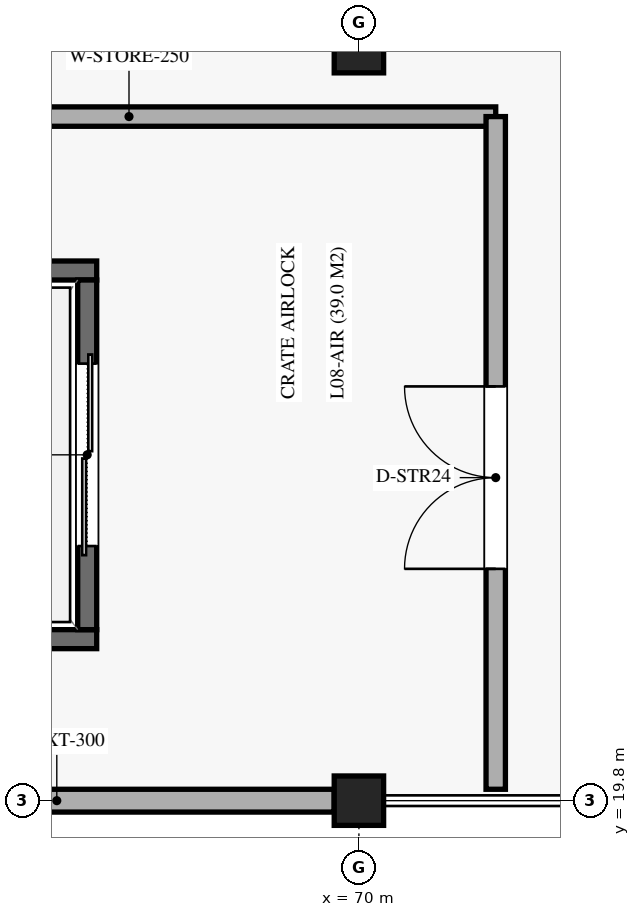
"""IFC4 building model, lengths in metres.
Left out: names, types, materials, properties, quantities, classifications, styles, units other than length and angle.
Written with IfcOpenShell. Run it as: python <this file> out.ifc"""

import sys

from ifc_helpers import new_model, si_unit, direction, frame, frame_2d, origin, origin_2d, place, context, subcontext, project, spatial, rectangle, extrude, element, fill, save


model = new_model("IFC4")
c1 = context("Model", 3, precision=1e-05, world=origin(), true_north=direction((0.0, 1.0)))
c2 = subcontext(c1, "Body", "Model", "MODEL_VIEW")
j1 = project(units=[si_unit("LENGTHUNIT", "METRE"), si_unit("PLANEANGLEUNIT", "RADIAN")], contexts=[c1])
p1 = place(None, origin())
s1 = spatial("IfcSite", under=j1, at=p1, CompositionType="ELEMENT")
p2 = place(p1, origin())
s2 = spatial("IfcBuilding", under=s1, at=p2, CompositionType="ELEMENT")
p3 = place(p2, frame((0.0, 0.0, 42.33)))
s3 = spatial("IfcBuildingStorey", under=s2, at=p3, CompositionType="ELEMENT", Elevation=42.33)
for number, where, z_axis, x_axis in (
    (1, (70.0, 19.8, 0.0), (0.0, 0.0, 1.0), (1.0, 0.0, 0.0)),
    (2, (70.0, 29.7, 0.0), (0.0, 0.0, 1.0), (1.0, 0.0, 0.0)),
):
    element("IfcColumn", number, at=place(p3, frame(where, z_axis=z_axis, x_axis=x_axis)), inside=s3, PredefinedType="COLUMN", context=c2, shape_type="SweptSolid", body=[
        extrude(rectangle(XDim=0.65, YDim=0.65, at=origin_2d()), origin(), (0.0, 0.0, 1.0), 4.59),
    ])
p4 = place(p3, frame((62.375, 19.8, 0.0), z_axis=(0.0, 0.0, 1.0), x_axis=(1.0, 0.0, 0.0)))
e3 = element("IfcWall", 3, at=p4, inside=s3, PredefinedType="SOLIDWALL", context=c2, shape_type="SweptSolid", body=[
    extrude(rectangle(XDim=7.3, YDim=0.3, at=frame_2d((3.65, 0.0))), origin(), (0.0, 0.0, 1.0), 3.59),
])
for number, where, z_axis, x_axis in (
    (4, (62.65, 21.925, 0.0), (0.0, 0.0, 1.0), (1.0, 0.0, 0.0)),
    (5, (62.65, 26.775, 0.0), (0.0, 0.0, 1.0), (1.0, 0.0, 0.0)),
):
    element("IfcWall", number, at=place(p3, frame(where, z_axis=z_axis, x_axis=x_axis)), inside=s3, PredefinedType="SOLIDWALL", context=c2, shape_type="SweptSolid", body=[
        extrude(rectangle(XDim=3.9, YDim=0.25, at=frame_2d((1.95, 0.0))), origin(), (0.0, 0.0, 1.0), 4.32),
    ])
p5 = place(p3, frame((66.425, 22.05, 0.0), z_axis=(0.0, 0.0, 1.0), x_axis=(0.0, 1.0, 0.0)))
e6 = element("IfcWall", 6, at=p5, inside=s3, PredefinedType="SOLIDWALL", context=c2, shape_type="SweptSolid", body=[
    extrude(rectangle(XDim=4.6, YDim=0.25, at=frame_2d((2.3, 0.0))), origin(), (0.0, 0.0, 1.0), 4.32),
])
p6 = place(p5, frame((1.1, 0.0, 0.0)))
e7 = element("IfcOpeningElement", 7, at=p6, cuts=e6, PredefinedType="OPENING", context=c2, shape_type="SweptSolid", body=[
    extrude(rectangle(XDim=2.4, YDim=2.65, at=frame_2d((1.2, 1.325))), frame((0.0, 0.135, 0.0), z_axis=(0.0, -1.0, 0.0), x_axis=(1.0, 0.0, 0.0)), (0.0, 0.0, 1.0), 0.27),
])
p7 = place(p3, frame((62.15, 28.8, 0.0), z_axis=(0.0, 0.0, 1.0), x_axis=(1.0, 0.0, 0.0)))
e8 = element("IfcWall", 8, at=p7, inside=s3, PredefinedType="SOLIDWALL", context=c2, shape_type="SweptSolid", body=[
    extrude(rectangle(XDim=9.65, YDim=0.255, at=frame_2d((4.825, 0.0))), origin(), (0.0, 0.0, 1.0), 3.46),
])
p8 = place(p3, frame((71.8, 19.95, 0.0), z_axis=(0.0, 0.0, 1.0), x_axis=(0.0, 1.0, 0.0)))
e9 = element("IfcWall", 9, at=p8, inside=s3, PredefinedType="SOLIDWALL", context=c2, shape_type="SweptSolid", body=[
    extrude(rectangle(XDim=8.85, YDim=0.255, at=frame_2d((4.425, 0.0))), origin(), (0.0, 0.0, 1.0), 3.46),
])
p9 = place(p8, frame((2.9, 0.0, 0.0)))
e10 = element("IfcOpeningElement", 10, at=p9, cuts=e9, PredefinedType="OPENING", context=c2, shape_type="SweptSolid", body=[
    extrude(rectangle(XDim=2.4, YDim=2.5, at=frame_2d((1.2, 1.25))), frame((0.0, 0.137, 0.0), z_axis=(0.0, -1.0, 0.0), x_axis=(1.0, 0.0, 0.0)), (0.0, 0.0, 1.0), 0.275),
])
p10 = place(p6, origin())
e11 = element("IfcDoor", 11, at=p10, inside=s3, OperationType="DOUBLE_DOOR_SLIDING", PredefinedType="DOOR", context=c2, shape_type="SweptSolid", body=[
    extrude(rectangle(XDim=2.4, YDim=2.65, at=frame_2d((1.2, 1.325))), frame((0.0, 0.025, 0.0), z_axis=(0.0, -1.0, 0.0), x_axis=(1.0, 0.0, 0.0)), (0.0, 0.0, 1.0), 0.05),
])
fill(e7, e11)
p11 = place(p9, origin())
e12 = element("IfcDoor", 12, at=p11, inside=s3, OperationType="DOUBLE_DOOR_SINGLE_SWING", PredefinedType="DOOR", context=c2, shape_type="SweptSolid", body=[
    extrude(rectangle(XDim=2.4, YDim=2.5, at=frame_2d((1.2, 1.25))), frame((0.0, 0.025, 0.0), z_axis=(0.0, -1.0, 0.0), x_axis=(1.0, 0.0, 0.0)), (0.0, 0.0, 1.0), 0.05),
])
fill(e10, e12)
save(model, sys.argv[1])
